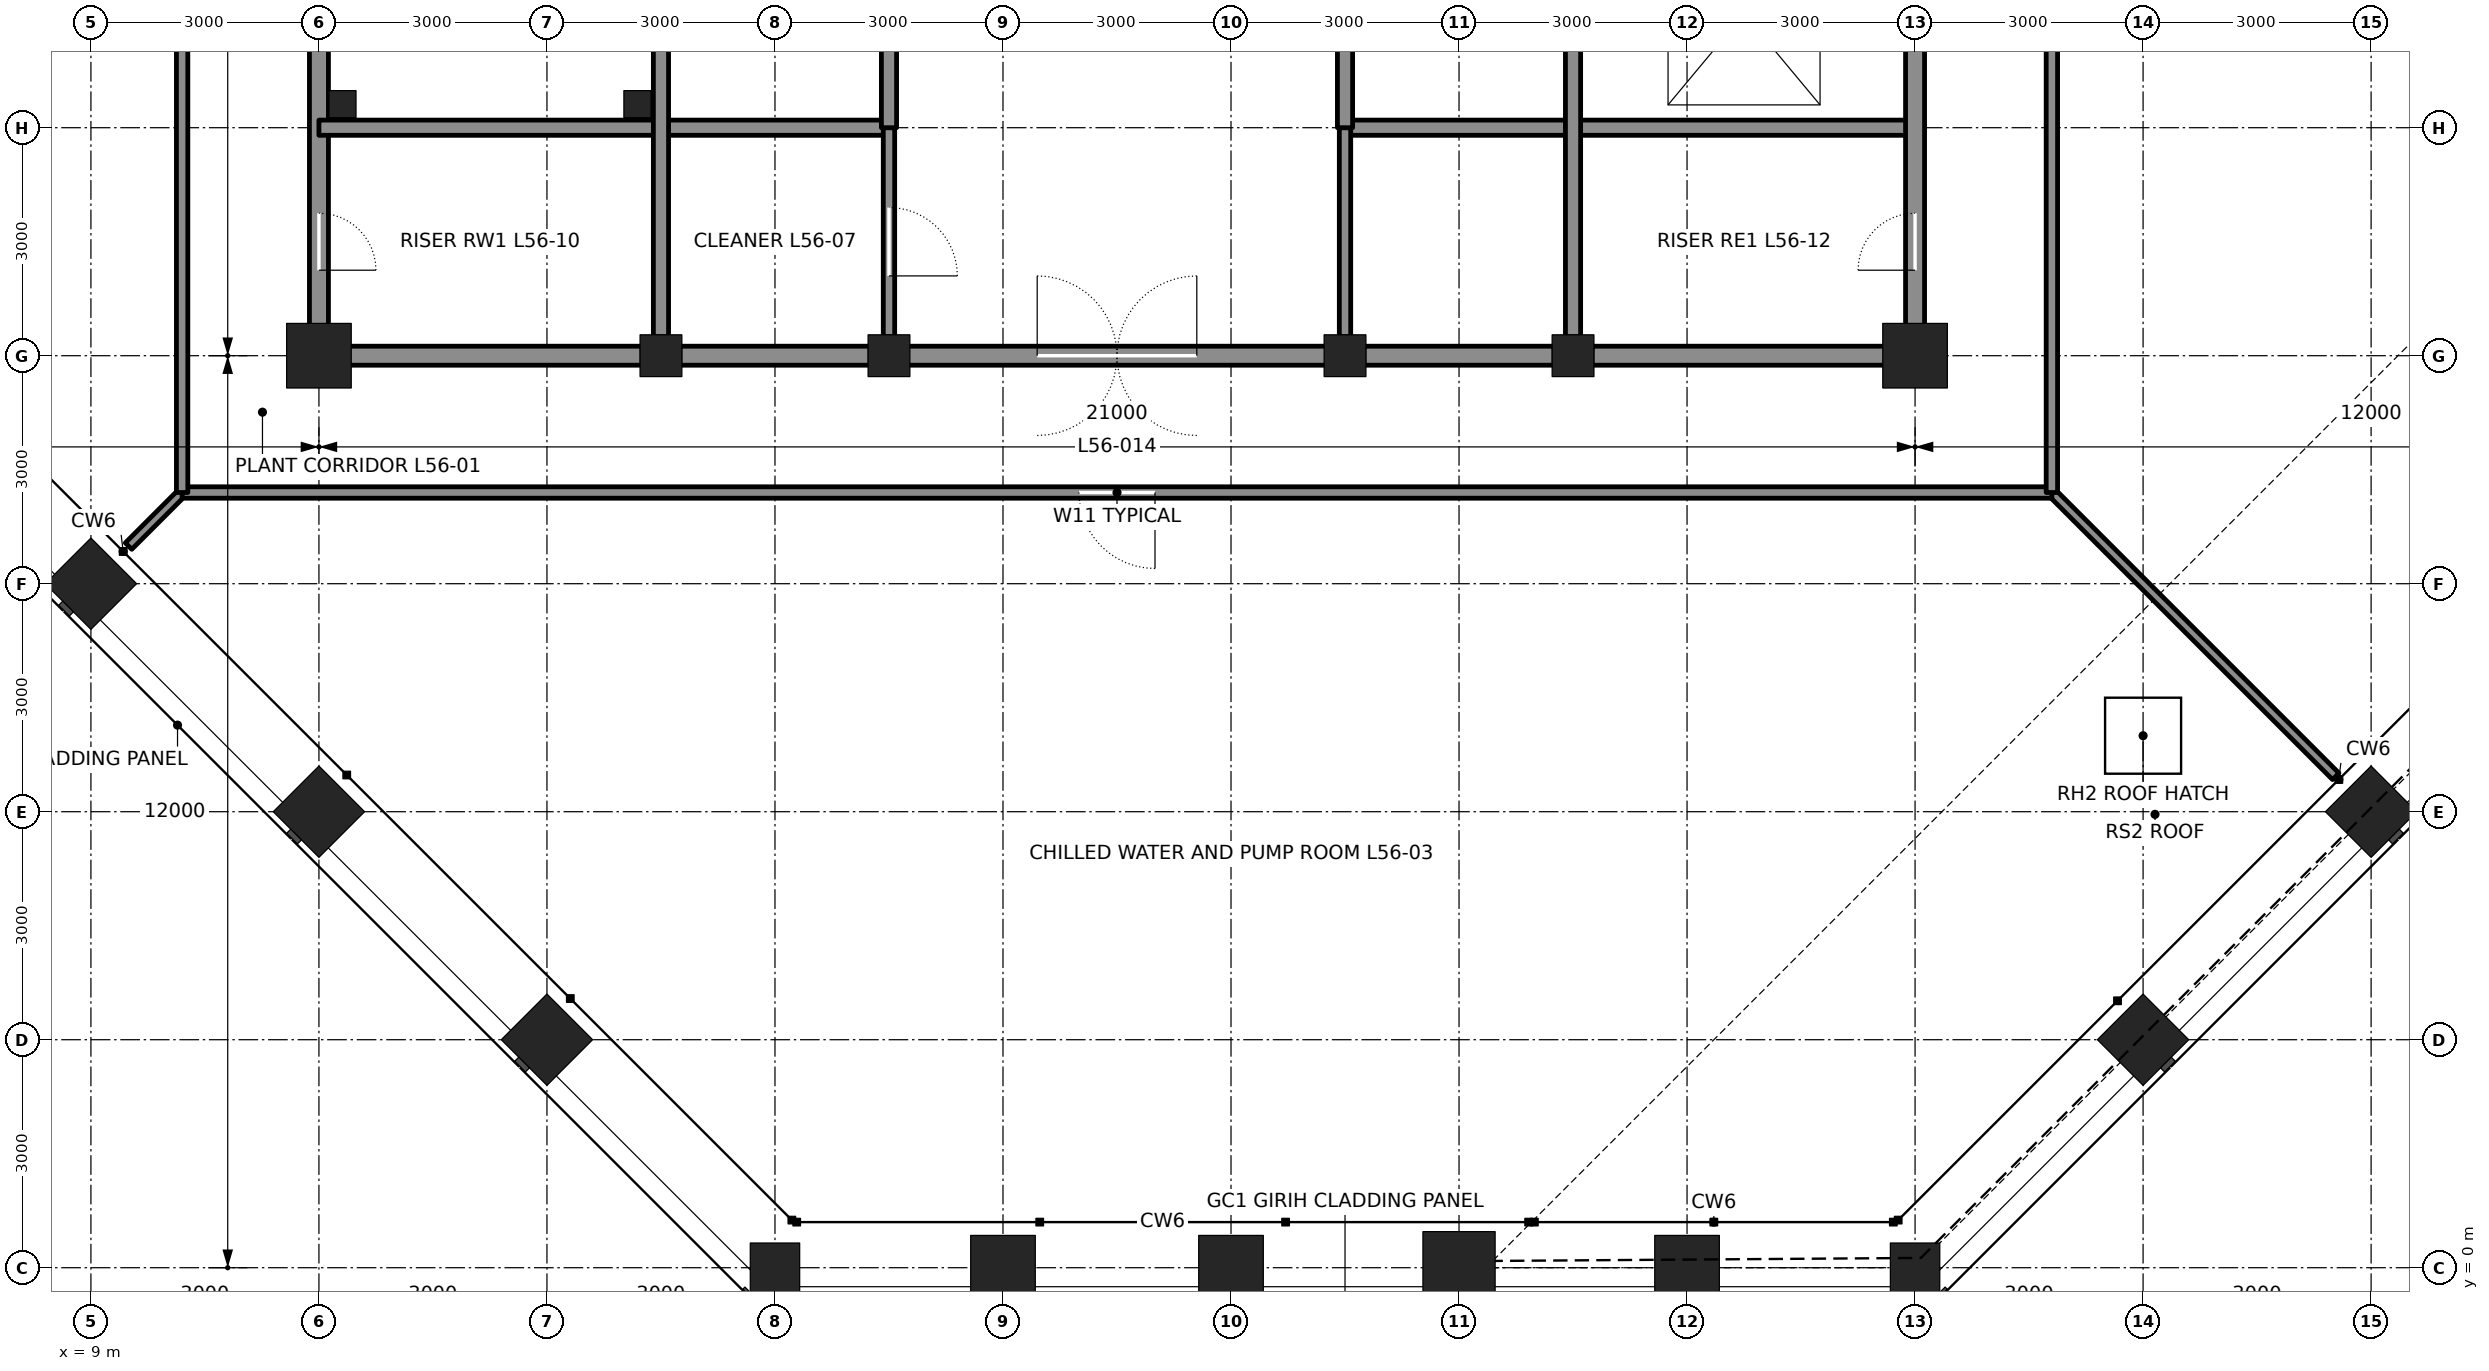
"""IFC4 building model, lengths in metres.
Left out: names, types, materials, properties, quantities, classifications, styles, units other than length and angle.
Written with IfcOpenShell. Run it as: python <this file> out.ifc"""

import sys

from ifc_helpers import new_model, si_unit, direction, frame, frame_2d, origin, origin_2d, place, context, subcontext, project, spatial, rectangle, hollow_rectangle, extrude, element, fill, save


model = new_model("IFC4")
c1 = context("Model", 3, precision=1e-05, world=origin(), true_north=direction((0.0, 1.0)))
c2 = subcontext(c1, "Body", "Model", "MODEL_VIEW")
j1 = project(units=[si_unit("LENGTHUNIT", "METRE"), si_unit("PLANEANGLEUNIT", "RADIAN")], contexts=[c1])
p1 = place(None, origin())
s1 = spatial("IfcSite", under=j1, at=p1, CompositionType="ELEMENT")
p2 = place(p1, origin())
s2 = spatial("IfcBuilding", under=s1, at=p2, CompositionType="ELEMENT")
p3 = place(p2, frame((0.0, 0.0, 251.7)))
s3 = spatial("IfcBuildingStorey", under=s2, at=p3, CompositionType="ELEMENT", Elevation=251.7)
p4 = place(p3, frame((18.0, 0.0, 0.0), z_axis=(0.0, 0.0, 1.0), x_axis=(0.0, -1.0, 0.0)))
e1 = element("IfcColumn", 1, at=p4, inside=s3, PredefinedType="COLUMN", context=c2, shape_type="SweptSolid", body=[
    extrude(hollow_rectangle(XDim=0.65, YDim=0.65, WallThickness=0.065, at=origin_2d()), origin(), (0.0, 0.0, 1.0), 6.0),
])
for number, where, z_axis, x_axis in (
    (2, (21.0, 0.0, 0.0), (0.0, 0.0, 1.0), (0.0, -1.0, 0.0)),
    (3, (24.0, 0.0, 0.0), (0.0, 0.0, 1.0), (0.0, -1.0, 0.0)),
):
    element("IfcColumn", number, at=place(p3, frame(where, z_axis=z_axis, x_axis=x_axis)), inside=s3, PredefinedType="COLUMN", context=c2, shape_type="SweptSolid", body=[
        extrude(hollow_rectangle(XDim=0.85, YDim=0.85, WallThickness=0.085, at=origin_2d()), origin(), (0.0, 0.0, 1.0), 6.0),
    ])
p5 = place(p3, frame((27.0, 0.0, 0.0), z_axis=(0.0, 0.0, 1.0), x_axis=(0.0, -1.0, 0.0)))
e4 = element("IfcColumn", 4, at=p5, inside=s3, PredefinedType="COLUMN", context=c2, shape_type="SweptSolid", body=[
    extrude(hollow_rectangle(XDim=0.95, YDim=0.95, WallThickness=0.11, at=origin_2d()), origin(), (0.0, 0.0, 1.0), 6.0),
])
p6 = place(p3, frame((30.0, 0.0, 0.0), z_axis=(0.0, 0.0, 1.0), x_axis=(0.0, -1.0, 0.0)))
e5 = element("IfcColumn", 5, at=p6, inside=s3, PredefinedType="COLUMN", context=c2, shape_type="SweptSolid", body=[
    extrude(hollow_rectangle(XDim=0.85, YDim=0.85, WallThickness=0.085, at=origin_2d()), origin(), (0.0, 0.0, 1.0), 4.149),
])
p7 = place(p3, frame((33.0, 0.0, 0.0), z_axis=(0.0, 0.0, 1.0), x_axis=(0.0, -1.0, 0.0)))
e6 = element("IfcColumn", 6, at=p7, inside=s3, PredefinedType="COLUMN", context=c2, shape_type="SweptSolid", body=[
    extrude(hollow_rectangle(XDim=0.65, YDim=0.65, WallThickness=0.065, at=origin_2d()), origin(), (0.0, 0.0, 1.0), 3.698),
])
for number, where, z_axis, x_axis in (
    (7, (36.0, 3.0, 0.0), (0.0, 0.0, 1.0), (0.707, -0.707, 0.0)),
    (8, (39.0, 6.0, 0.0), (0.0, 0.0, 1.0), (0.707, -0.707, 0.0)),
):
    element("IfcColumn", number, at=place(p3, frame(where, z_axis=z_axis, x_axis=x_axis)), inside=s3, PredefinedType="COLUMN", context=c2, shape_type="SweptSolid", body=[
        extrude(hollow_rectangle(XDim=0.85, YDim=0.85, WallThickness=0.085, at=origin_2d()), origin(), (0.0, 0.0, 1.0), 3.698),
    ])
for number, where, z_axis, x_axis in (
    (9, (9.0, 9.0, 0.0), (0.0, 0.0, 1.0), (-0.707, -0.707, 0.0)),
    (10, (12.0, 6.0, 0.0), (0.0, 0.0, 1.0), (-0.707, -0.707, 0.0)),
    (11, (15.0, 3.0, 0.0), (0.0, 0.0, 1.0), (-0.707, -0.707, 0.0)),
    (12, (12.0, 12.0, 0.0), (0.0, 0.0, 1.0), (1.0, 0.0, 0.0)),
):
    element("IfcColumn", number, at=place(p3, frame(where, z_axis=z_axis, x_axis=x_axis)), inside=s3, PredefinedType="COLUMN", context=c2, shape_type="SweptSolid", body=[
        extrude(hollow_rectangle(XDim=0.85, YDim=0.85, WallThickness=0.085, at=origin_2d()), origin(), (0.0, 0.0, 1.0), 6.0),
    ])
for number, where, z_axis, x_axis in (
    (13, (16.5, 12.0, 0.0), (0.0, 0.0, 1.0), (1.0, 0.0, 0.0)),
    (14, (19.5, 12.0, 0.0), (0.0, 0.0, 1.0), (1.0, 0.0, 0.0)),
    (15, (25.5, 12.0, 0.0), (0.0, 0.0, 1.0), (1.0, 0.0, 0.0)),
    (16, (28.5, 12.0, 0.0), (0.0, 0.0, 1.0), (1.0, 0.0, 0.0)),
):
    element("IfcColumn", number, at=place(p3, frame(where, z_axis=z_axis, x_axis=x_axis)), inside=s3, PredefinedType="COLUMN", context=c2, shape_type="SweptSolid", body=[
        extrude(hollow_rectangle(XDim=0.55, YDim=0.55, WallThickness=0.045, at=origin_2d()), origin(), (0.0, 0.0, 1.0), 6.0),
    ])
p8 = place(p3, frame((33.0, 12.0, 0.0), z_axis=(0.0, 0.0, 1.0), x_axis=(1.0, 0.0, 0.0)))
e17 = element("IfcColumn", 17, at=p8, inside=s3, PredefinedType="COLUMN", context=c2, shape_type="SweptSolid", body=[
    extrude(hollow_rectangle(XDim=0.85, YDim=0.85, WallThickness=0.085, at=origin_2d()), origin(), (0.0, 0.0, 1.0), 6.0),
])
p9 = place(p3, frame((12.0, 12.25, 0.0), z_axis=(0.0, 0.0, 1.0), x_axis=(0.0, 1.0, 0.0)))
e18 = element("IfcWall", 18, at=p9, inside=s3, PredefinedType="SOLIDWALL", context=c2, shape_type="SweptSolid", body=[
    extrude(rectangle(XDim=8.5, YDim=0.25, at=frame_2d((4.25, 0.0))), origin(), (0.0, 0.0, 1.0), 4.913),
])
p10 = place(p9, frame((0.875, 0.0, 0.0)))
e19 = element("IfcOpeningElement", 19, at=p10, cuts=e18, PredefinedType="OPENING", context=c2, shape_type="SweptSolid", body=[
    extrude(rectangle(XDim=0.75, YDim=2.1, at=frame_2d((0.375, 1.05))), frame((0.0, 0.135, 0.0), z_axis=(0.0, -1.0, 0.0), x_axis=(1.0, 0.0, 0.0)), (0.0, 0.0, 1.0), 0.27),
])
p11 = place(p3, frame((12.25, 12.0, 0.0), z_axis=(0.0, 0.0, 1.0), x_axis=(1.0, 0.0, 0.0)))
e20 = element("IfcWall", 20, at=p11, inside=s3, PredefinedType="SOLIDWALL", context=c2, shape_type="SweptSolid", body=[
    extrude(rectangle(XDim=4.0, YDim=0.25, at=frame_2d((2.0, 0.0))), origin(), (0.0, 0.0, 1.0), 4.981),
])
for number, where, z_axis, x_axis in (
    (21, (16.75, 12.0, 0.0), (0.0, 0.0, 1.0), (1.0, 0.0, 0.0)),
    (22, (25.75, 12.0, 0.0), (0.0, 0.0, 1.0), (1.0, 0.0, 0.0)),
):
    element("IfcWall", number, at=place(p3, frame(where, z_axis=z_axis, x_axis=x_axis)), inside=s3, PredefinedType="SOLIDWALL", context=c2, shape_type="SweptSolid", body=[
        extrude(rectangle(XDim=2.5, YDim=0.25, at=frame_2d((1.25, 0.0))), origin(), (0.0, 0.0, 1.0), 4.981),
    ])
p12 = place(p3, frame((28.75, 12.0, 0.0), z_axis=(0.0, 0.0, 1.0), x_axis=(1.0, 0.0, 0.0)))
e23 = element("IfcWall", 23, at=p12, inside=s3, PredefinedType="SOLIDWALL", context=c2, shape_type="SweptSolid", body=[
    extrude(rectangle(XDim=4.0, YDim=0.25, at=frame_2d((2.0, 0.0))), origin(), (0.0, 0.0, 1.0), 4.981),
])
for number, where, z_axis, x_axis in (
    (24, (12.0, 15.0, 0.0), (0.0, 0.0, 1.0), (1.0, 0.0, 0.0)),
    (25, (25.5, 15.0, 0.0), (0.0, 0.0, 1.0), (1.0, 0.0, 0.0)),
):
    element("IfcWall", number, at=place(p3, frame(where, z_axis=z_axis, x_axis=x_axis)), inside=s3, PredefinedType="SOLIDWALL", context=c2, shape_type="SweptSolid", body=[
        extrude(rectangle(XDim=7.5, YDim=0.2, at=frame_2d((3.75, 0.0))), origin(), (0.0, 0.0, 1.0), 5.84),
    ])
p13 = place(p3, frame((16.5, 12.25, 0.0), z_axis=(0.0, 0.0, 1.0), x_axis=(0.0, 1.0, 0.0)))
e26 = element("IfcWall", 26, at=p13, inside=s3, PredefinedType="SOLIDWALL", context=c2, shape_type="SweptSolid", body=[
    extrude(rectangle(XDim=8.5, YDim=0.2, at=frame_2d((4.25, 0.0))), origin(), (0.0, 0.0, 1.0), 4.913),
])
p14 = place(p3, frame((19.5, 12.25, 0.0), z_axis=(0.0, 0.0, 1.0), x_axis=(0.0, 1.0, 0.0)))
e27 = element("IfcWall", 27, at=p14, inside=s3, PredefinedType="PARTITIONING", context=c2, shape_type="SweptSolid", body=[
    extrude(rectangle(XDim=2.75, YDim=0.15, at=frame_2d((1.375, 0.0))), origin(), (0.0, 0.0, 1.0), 4.865),
])
p15 = place(p14, frame((0.8, 0.0, 0.0)))
e28 = element("IfcOpeningElement", 28, at=p15, cuts=e27, PredefinedType="OPENING", context=c2, shape_type="SweptSolid", body=[
    extrude(rectangle(XDim=0.9, YDim=2.1, at=frame_2d((0.45, 1.05))), frame((0.0, 0.085, 0.0), z_axis=(0.0, -1.0, 0.0), x_axis=(1.0, 0.0, 0.0)), (0.0, 0.0, 1.0), 0.17),
])
p16 = place(p3, frame((19.5, 15.0, 0.0), z_axis=(0.0, 0.0, 1.0), x_axis=(0.0, 1.0, 0.0)))
e29 = element("IfcWall", 29, at=p16, inside=s3, PredefinedType="SOLIDWALL", context=c2, shape_type="SweptSolid", body=[
    extrude(rectangle(XDim=12.0, YDim=0.2, at=frame_2d((6.0, 0.0))), origin(), (0.0, 0.0, 1.0), 4.865),
])
p17 = place(p3, frame((25.5, 12.25, 0.0), z_axis=(0.0, 0.0, 1.0), x_axis=(0.0, 1.0, 0.0)))
e30 = element("IfcWall", 30, at=p17, inside=s3, PredefinedType="PARTITIONING", context=c2, shape_type="SweptSolid", body=[
    extrude(rectangle(XDim=2.75, YDim=0.15, at=frame_2d((1.375, 0.0))), origin(), (0.0, 0.0, 1.0), 4.865),
])
p18 = place(p3, frame((25.5, 15.0, 0.0), z_axis=(0.0, 0.0, 1.0), x_axis=(0.0, 1.0, 0.0)))
e31 = element("IfcWall", 31, at=p18, inside=s3, PredefinedType="SOLIDWALL", context=c2, shape_type="SweptSolid", body=[
    extrude(rectangle(XDim=12.0, YDim=0.2, at=frame_2d((6.0, 0.0))), origin(), (0.0, 0.0, 1.0), 4.865),
])
p19 = place(p3, frame((28.5, 12.25, 0.0), z_axis=(0.0, 0.0, 1.0), x_axis=(0.0, 1.0, 0.0)))
e32 = element("IfcWall", 32, at=p19, inside=s3, PredefinedType="SOLIDWALL", context=c2, shape_type="SweptSolid", body=[
    extrude(rectangle(XDim=8.5, YDim=0.2, at=frame_2d((4.25, 0.0))), origin(), (0.0, 0.0, 1.0), 4.913),
])
p20 = place(p3, frame((33.0, 12.25, 0.0), z_axis=(0.0, 0.0, 1.0), x_axis=(0.0, 1.0, 0.0)))
e33 = element("IfcWall", 33, at=p20, inside=s3, PredefinedType="SOLIDWALL", context=c2, shape_type="SweptSolid", body=[
    extrude(rectangle(XDim=8.5, YDim=0.25, at=frame_2d((4.25, 0.0))), origin(), (0.0, 0.0, 1.0), 4.913),
])
p21 = place(p20, frame((6.65, 0.0, 0.0)))
e34 = element("IfcOpeningElement", 34, at=p21, cuts=e33, PredefinedType="OPENING", context=c2, shape_type="SweptSolid", body=[
    extrude(rectangle(XDim=1.2, YDim=2.1, at=frame_2d((0.6, 1.05))), frame((0.0, 0.135, 0.0), z_axis=(0.0, -1.0, 0.0), x_axis=(1.0, 0.0, 0.0)), (0.0, 0.0, 1.0), 0.27),
])
p22 = place(p20, frame((0.875, 0.0, 0.0)))
e35 = element("IfcOpeningElement", 35, at=p22, cuts=e33, PredefinedType="OPENING", context=c2, shape_type="SweptSolid", body=[
    extrude(rectangle(XDim=0.75, YDim=2.1, at=frame_2d((0.375, 1.05))), frame((0.0, 0.135, 0.0), z_axis=(0.0, -1.0, 0.0), x_axis=(1.0, 0.0, 0.0)), (0.0, 0.0, 1.0), 0.27),
])
p23 = place(p3, frame((19.5, 12.0, 0.0), z_axis=(0.0, 0.0, 1.0), x_axis=(1.0, 0.0, 0.0)))
e36 = element("IfcWall", 36, at=p23, inside=s3, PredefinedType="SOLIDWALL", context=c2, shape_type="SweptSolid", body=[
    extrude(rectangle(XDim=6.0, YDim=0.25, at=frame_2d((3.0, 0.0))), origin(), (0.0, 0.0, 1.0), 4.981),
])
p24 = place(p23, frame((1.95, 0.0, 0.0)))
e37 = element("IfcOpeningElement", 37, at=p24, cuts=e36, PredefinedType="OPENING", context=c2, shape_type="SweptSolid", body=[
    extrude(rectangle(XDim=2.1, YDim=2.4, at=frame_2d((1.05, 1.2))), frame((0.0, 0.135, 0.0), z_axis=(0.0, -1.0, 0.0), x_axis=(1.0, 0.0, 0.0)), (0.0, 0.0, 1.0), 0.27),
])
p25 = place(p3, frame((10.2, 10.2, 0.0), z_axis=(0.0, 0.0, 1.0), x_axis=(-0.707106781187, -0.707106781187, 0.0)))
e38 = element("IfcWall", 38, at=p25, inside=s3, PredefinedType="PARTITIONING", context=c2, shape_type="SweptSolid", body=[
    extrude(rectangle(XDim=0.997, YDim=0.12, at=frame_2d((0.499, 0.0))), origin(), (0.0, 0.0, 1.0), 5.84),
])
p26 = place(p3, frame((34.8, 10.2, 0.0), z_axis=(0.0, 0.0, 1.0), x_axis=(0.707106781187, -0.707106781187, 0.0)))
e39 = element("IfcWall", 39, at=p26, inside=s3, PredefinedType="PARTITIONING", context=c2, shape_type="SweptSolid", body=[
    extrude(rectangle(XDim=5.282, YDim=0.12, at=frame_2d((2.641, 0.0))), origin(), (0.0, 0.0, 1.0), 5.84),
])
p27 = place(p3, frame((10.2, 10.2, 0.0), z_axis=(0.0, 0.0, 1.0), x_axis=(1.0, 0.0, 0.0)))
e40 = element("IfcWall", 40, at=p27, inside=s3, PredefinedType="PARTITIONING", context=c2, shape_type="SweptSolid", body=[
    extrude(rectangle(XDim=24.6, YDim=0.15, at=frame_2d((12.3, 0.0))), origin(), (0.0, 0.0, 1.0), 5.84),
])
p28 = place(p27, frame((11.8, 0.0, 0.0)))
e41 = element("IfcOpeningElement", 41, at=p28, cuts=e40, PredefinedType="OPENING", context=c2, shape_type="SweptSolid", body=[
    extrude(rectangle(XDim=1.0, YDim=2.4, at=frame_2d((0.5, 1.2))), frame((0.0, 0.085, 0.0), z_axis=(0.0, -1.0, 0.0), x_axis=(1.0, 0.0, 0.0)), (0.0, 0.0, 1.0), 0.17),
])
p29 = place(p3, frame((10.2, 10.2, 0.0), z_axis=(0.0, 0.0, 1.0), x_axis=(0.0, 1.0, 0.0)))
e42 = element("IfcWall", 42, at=p29, inside=s3, PredefinedType="PARTITIONING", context=c2, shape_type="SweptSolid", body=[
    extrude(rectangle(XDim=24.6, YDim=0.15, at=frame_2d((12.3, 0.0))), origin(), (0.0, 0.0, 1.0), 5.84),
])
p30 = place(p29, frame((11.8, 0.0, 0.0)))
e43 = element("IfcOpeningElement", 43, at=p30, cuts=e42, PredefinedType="OPENING", context=c2, shape_type="SweptSolid", body=[
    extrude(rectangle(XDim=1.0, YDim=2.4, at=frame_2d((0.5, 1.2))), frame((0.0, 0.085, 0.0), z_axis=(0.0, -1.0, 0.0), x_axis=(1.0, 0.0, 0.0)), (0.0, 0.0, 1.0), 0.17),
])
p31 = place(p3, frame((34.8, 10.2, 0.0), z_axis=(0.0, 0.0, 1.0), x_axis=(0.0, 1.0, 0.0)))
e44 = element("IfcWall", 44, at=p31, inside=s3, PredefinedType="PARTITIONING", context=c2, shape_type="SweptSolid", body=[
    extrude(rectangle(XDim=24.6, YDim=0.15, at=frame_2d((12.3, 0.0))), origin(), (0.0, 0.0, 1.0), 5.84),
])
p32 = place(p31, frame((11.8, 0.0, 0.0)))
e45 = element("IfcOpeningElement", 45, at=p32, cuts=e44, PredefinedType="OPENING", context=c2, shape_type="SweptSolid", body=[
    extrude(rectangle(XDim=1.0, YDim=2.4, at=frame_2d((0.5, 1.2))), frame((0.0, 0.085, 0.0), z_axis=(0.0, -1.0, 0.0), x_axis=(1.0, 0.0, 0.0)), (0.0, 0.0, 1.0), 0.17),
])
for number, where, z_axis, x_axis in (
    (46, (12.31, 15.31, 0.0), (0.0, 0.0, 1.0), (1.0, 0.0, 0.0)),
    (47, (16.19, 15.31, 0.0), (0.0, 0.0, 1.0), (1.0, 0.0, 0.0)),
):
    element("IfcColumn", number, at=place(p3, frame(where, z_axis=z_axis, x_axis=x_axis)), inside=s3, PredefinedType="COLUMN", context=c2, shape_type="SweptSolid", body=[
        extrude(hollow_rectangle(XDim=0.356, YDim=0.356, WallThickness=0.009, at=origin_2d()), origin(), (0.0, 0.0, 1.0), 6.0),
    ])
p33 = place(p3, frame((36.0, 7.0, 5.195)))
p34 = place(p33, frame((0.0, 0.0, 0.454)))
e48 = element("IfcDoor", 48, at=p34, inside=s3, OperationType="SINGLE_SWING_LEFT", PredefinedType="TRAPDOOR", context=c2, shape_type="SweptSolid", body=[
    extrude(rectangle(XDim=1.0, YDim=1.0, at=origin_2d()), origin(), (0.0, 0.0, 1.0), 0.05),
])
p35 = place(p24, origin())
e49 = element("IfcDoor", 49, at=p35, inside=s3, OperationType="DOUBLE_DOOR_DOUBLE_SWING", PredefinedType="DOOR", context=c2, shape_type="SweptSolid", body=[
    extrude(rectangle(XDim=2.1, YDim=2.4, at=frame_2d((1.05, 1.2))), frame((0.0, 0.025, 0.0), z_axis=(0.0, -1.0, 0.0), x_axis=(1.0, 0.0, 0.0)), (0.0, 0.0, 1.0), 0.05),
])
fill(e37, e49)
p36 = place(p10, frame((0.75, 0.0, 0.0), z_axis=(0.0, 0.0, 1.0), x_axis=(-1.0, 0.0, 0.0)))
e50 = element("IfcDoor", 50, at=p36, inside=s3, OperationType="SINGLE_SWING_RIGHT", PredefinedType="DOOR", context=c2, shape_type="SweptSolid", body=[
    extrude(rectangle(XDim=0.75, YDim=2.1, at=frame_2d((0.375, 1.05))), frame((0.0, 0.025, 0.0), z_axis=(0.0, -1.0, 0.0), x_axis=(1.0, 0.0, 0.0)), (0.0, 0.0, 1.0), 0.05),
])
fill(e19, e50)
p37 = place(p22, origin())
e51 = element("IfcDoor", 51, at=p37, inside=s3, OperationType="SINGLE_SWING_LEFT", PredefinedType="DOOR", context=c2, shape_type="SweptSolid", body=[
    extrude(rectangle(XDim=0.75, YDim=2.1, at=frame_2d((0.375, 1.05))), frame((0.0, 0.025, 0.0), z_axis=(0.0, -1.0, 0.0), x_axis=(1.0, 0.0, 0.0)), (0.0, 0.0, 1.0), 0.05),
])
fill(e35, e51)
p38 = place(p15, frame((0.9, 0.0, 0.0), z_axis=(0.0, 0.0, 1.0), x_axis=(-1.0, 0.0, 0.0)))
e52 = element("IfcDoor", 52, at=p38, inside=s3, OperationType="SINGLE_SWING_RIGHT", PredefinedType="DOOR", context=c2, shape_type="SweptSolid", body=[
    extrude(rectangle(XDim=0.9, YDim=2.1, at=frame_2d((0.45, 1.05))), frame((0.0, 0.025, 0.0), z_axis=(0.0, -1.0, 0.0), x_axis=(1.0, 0.0, 0.0)), (0.0, 0.0, 1.0), 0.05),
])
fill(e28, e52)
p39 = place(p28, frame((1.0, 0.0, 0.0), z_axis=(0.0, 0.0, 1.0), x_axis=(-1.0, 0.0, 0.0)))
e53 = element("IfcDoor", 53, at=p39, inside=s3, OperationType="SINGLE_SWING_LEFT", PredefinedType="DOOR", context=c2, shape_type="SweptSolid", body=[
    extrude(rectangle(XDim=1.0, YDim=2.4, at=frame_2d((0.5, 1.2))), frame((0.0, 0.025, 0.0), z_axis=(0.0, -1.0, 0.0), x_axis=(1.0, 0.0, 0.0)), (0.0, 0.0, 1.0), 0.05),
])
fill(e41, e53)
save(model, sys.argv[1])
